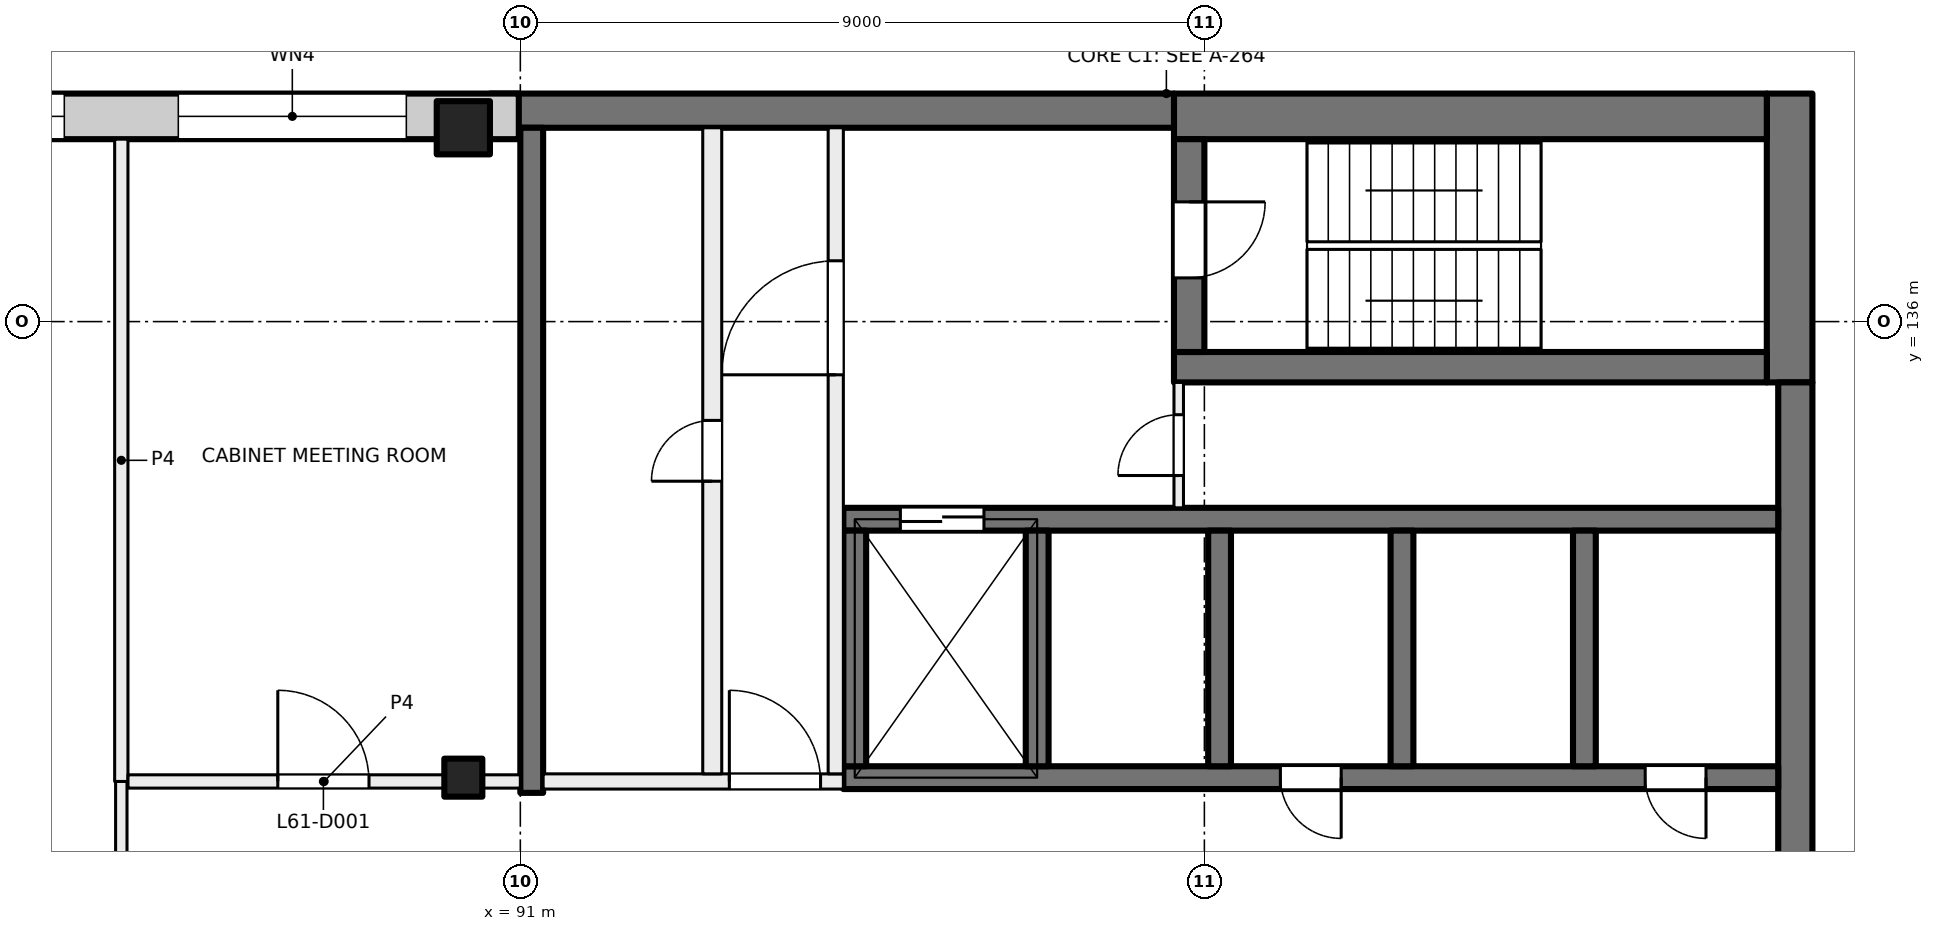
"""IFC4 building model, lengths in metres.
Left out: names, types, materials, properties, quantities, classifications, styles, units other than length and angle.
Written with IfcOpenShell. Run it as: python <this file> out.ifc"""

import sys

from ifc_helpers import new_model, si_unit, direction, frame, frame_2d, origin, origin_2d, place, context, subcontext, project, spatial, rectangle, extrude, element, fill, save


model = new_model("IFC4")
c1 = context("Model", 3, precision=1e-05, world=origin(), true_north=direction((0.0, 1.0)))
c2 = subcontext(c1, "Body", "Model", "MODEL_VIEW")
j1 = project(units=[si_unit("LENGTHUNIT", "METRE"), si_unit("PLANEANGLEUNIT", "RADIAN")], contexts=[c1])
p1 = place(None, origin())
s1 = spatial("IfcSite", under=j1, at=p1, CompositionType="ELEMENT")
p2 = place(p1, origin())
s2 = spatial("IfcBuilding", under=s1, at=p2, CompositionType="ELEMENT")
p3 = place(p2, frame((0.0, 0.0, 257.5)))
s3 = spatial("IfcBuildingStorey", under=s2, at=p3, CompositionType="ELEMENT", Elevation=257.5)
p4 = place(p3, frame((90.25, 130.0, 0.0), z_axis=(0.0, 0.0, 1.0), x_axis=(1.0, 0.0, 0.0)))
e1 = element("IfcColumn", 1, at=p4, inside=s3, PredefinedType="COLUMN", context=c2, shape_type="SweptSolid", body=[
    extrude(rectangle(XDim=0.5, YDim=0.5, at=origin_2d()), origin(), (0.0, 0.0, 1.0), 4.0),
])
p5 = place(p3, frame((90.25, 138.55, 0.0), z_axis=(0.0, 0.0, 1.0), x_axis=(1.0, 0.0, 0.0)))
e2 = element("IfcColumn", 2, at=p5, inside=s3, PredefinedType="COLUMN", context=c2, shape_type="SweptSolid", body=[
    extrude(rectangle(XDim=0.7, YDim=0.7, at=origin_2d()), origin(), (0.0, 0.0, 1.0), 4.0),
])
p6 = place(p3, frame((107.7, 139.0, 0.0), z_axis=(0.0, 0.0, 1.0), x_axis=(0.0, -1.0, 0.0)))
e3 = element("IfcWall", 3, at=p6, inside=s3, PredefinedType="SHEAR", context=c2, shape_type="SweptSolid", body=[
    extrude(rectangle(XDim=3.8, YDim=0.6, at=frame_2d((1.9, 0.0))), origin(), (0.0, 0.0, 1.0), 4.0),
])
p7 = place(p3, frame((107.775, 135.2, 0.0), z_axis=(0.0, 0.0, 1.0), x_axis=(0.0, -1.0, 0.0)))
e4 = element("IfcWall", 4, at=p7, inside=s3, PredefinedType="SHEAR", context=c2, shape_type="SweptSolid", body=[
    extrude(rectangle(XDim=14.4, YDim=0.45, at=frame_2d((7.2, 0.0))), origin(), (0.0, 0.0, 1.0), 4.0),
])
p8 = place(p3, frame((107.4, 138.7, 0.0), z_axis=(0.0, 0.0, 1.0), x_axis=(-1.0, 0.0, 0.0)))
e5 = element("IfcWall", 5, at=p8, inside=s3, PredefinedType="SHEAR", context=c2, shape_type="SweptSolid", body=[
    extrude(rectangle(XDim=7.8, YDim=0.6, at=frame_2d((3.9, 0.0))), origin(), (0.0, 0.0, 1.0), 4.0),
])
p9 = place(p3, frame((99.6, 138.775, 0.0), z_axis=(0.0, 0.0, 1.0), x_axis=(-1.0, 0.0, 0.0)))
e6 = element("IfcWall", 6, at=p9, inside=s3, PredefinedType="SHEAR", context=c2, shape_type="SweptSolid", body=[
    extrude(rectangle(XDim=9.0, YDim=0.45, at=frame_2d((4.5, 0.0))), origin(), (0.0, 0.0, 1.0), 4.0),
])
p10 = place(p3, frame((107.4, 135.4, 0.0), z_axis=(0.0, 0.0, 1.0), x_axis=(-1.0, 0.0, 0.0)))
e7 = element("IfcWall", 7, at=p10, inside=s3, PredefinedType="SHEAR", context=c2, shape_type="SweptSolid", body=[
    extrude(rectangle(XDim=7.8, YDim=0.4, at=frame_2d((3.9, 0.0))), origin(), (0.0, 0.0, 1.0), 4.0),
])
p11 = place(p3, frame((99.8, 138.4, 0.0), z_axis=(0.0, 0.0, 1.0), x_axis=(0.0, -1.0, 0.0)))
e8 = element("IfcWall", 8, at=p11, inside=s3, PredefinedType="SHEAR", context=c2, shape_type="SweptSolid", body=[
    extrude(rectangle(XDim=2.8, YDim=0.4, at=frame_2d((1.4, 0.0))), origin(), (0.0, 0.0, 1.0), 4.0),
])
p12 = place(p11, frame((0.825, 0.0, 0.0)))
e9 = element("IfcOpeningElement", 9, at=p12, cuts=e8, PredefinedType="OPENING", context=c2, shape_type="SweptSolid", body=[
    extrude(rectangle(XDim=1.0, YDim=2.1, at=frame_2d((0.5, 1.05))), frame((0.0, 0.21, 0.0), z_axis=(0.0, -1.0, 0.0), x_axis=(1.0, 0.0, 0.0)), (0.0, 0.0, 1.0), 0.42),
])
p13 = place(p3, frame((107.55, 130.0, 0.0), z_axis=(0.0, 0.0, 1.0), x_axis=(-1.0, 0.0, 0.0)))
e10 = element("IfcWall", 10, at=p13, inside=s3, PredefinedType="SHEAR", context=c2, shape_type="SweptSolid", body=[
    extrude(rectangle(XDim=12.3, YDim=0.3, at=frame_2d((6.15, 0.0))), origin(), (0.0, 0.0, 1.0), 4.0),
])
p14 = place(p13, frame((0.95, 0.0, 0.0)))
e11 = element("IfcOpeningElement", 11, at=p14, cuts=e10, PredefinedType="OPENING", context=c2, shape_type="SweptSolid", body=[
    extrude(rectangle(XDim=0.8, YDim=2.1, at=frame_2d((0.4, 1.05))), frame((0.0, 0.16, 0.0), z_axis=(0.0, -1.0, 0.0), x_axis=(1.0, 0.0, 0.0)), (0.0, 0.0, 1.0), 0.32),
])
p15 = place(p13, frame((5.75, 0.0, 0.0)))
e12 = element("IfcOpeningElement", 12, at=p15, cuts=e10, PredefinedType="OPENING", context=c2, shape_type="SweptSolid", body=[
    extrude(rectangle(XDim=0.8, YDim=2.1, at=frame_2d((0.4, 1.05))), frame((0.0, 0.16, 0.0), z_axis=(0.0, -1.0, 0.0), x_axis=(1.0, 0.0, 0.0)), (0.0, 0.0, 1.0), 0.32),
])
p16 = place(p3, frame((107.55, 133.4, 0.0), z_axis=(0.0, 0.0, 1.0), x_axis=(-1.0, 0.0, 0.0)))
e13 = element("IfcWall", 13, at=p16, inside=s3, PredefinedType="SHEAR", context=c2, shape_type="SweptSolid", body=[
    extrude(rectangle(XDim=12.3, YDim=0.3, at=frame_2d((6.15, 0.0))), origin(), (0.0, 0.0, 1.0), 4.0),
])
p17 = place(p16, frame((10.45, 0.0, 0.0)))
e14 = element("IfcOpeningElement", 14, at=p17, cuts=e13, PredefinedType="OPENING", context=c2, shape_type="SweptSolid", body=[
    extrude(rectangle(XDim=1.1, YDim=2.1, at=frame_2d((0.55, 1.05))), frame((0.0, 0.16, 0.0), z_axis=(0.0, -1.0, 0.0), x_axis=(1.0, 0.0, 0.0)), (0.0, 0.0, 1.0), 0.32),
])
for number, where, z_axis, x_axis in (
    (15, (105.0, 133.25, 0.0), (0.0, 0.0, 1.0), (0.0, -1.0, 0.0)),
    (16, (102.6, 133.25, 0.0), (0.0, 0.0, 1.0), (0.0, -1.0, 0.0)),
    (17, (100.2, 133.25, 0.0), (0.0, 0.0, 1.0), (0.0, -1.0, 0.0)),
    (18, (97.8, 133.25, 0.0), (0.0, 0.0, 1.0), (0.0, -1.0, 0.0)),
    (19, (95.4, 133.25, 0.0), (0.0, 0.0, 1.0), (0.0, -1.0, 0.0)),
):
    element("IfcWall", number, at=place(p3, frame(where, z_axis=z_axis, x_axis=x_axis)), inside=s3, PredefinedType="SHEAR", context=c2, shape_type="SweptSolid", body=[
        extrude(rectangle(XDim=3.1, YDim=0.3, at=frame_2d((1.55, 0.0))), origin(), (0.0, 0.0, 1.0), 4.0),
    ])
p18 = place(p3, frame((91.15, 138.55, 0.0), z_axis=(0.0, 0.0, 1.0), x_axis=(0.0, -1.0, 0.0)))
e20 = element("IfcWall", 20, at=p18, inside=s3, PredefinedType="SHEAR", context=c2, shape_type="SweptSolid", body=[
    extrude(rectangle(XDim=8.75, YDim=0.3, at=frame_2d((4.375, 0.0))), origin(), (0.0, 0.0, 1.0), 4.0),
])
p19 = place(p3, frame((47.07, 138.7, 0.0), z_axis=(0.0, 0.0, 1.0), x_axis=(1.0, 0.0, 0.0)))
e21 = element("IfcWall", 21, at=p19, inside=s3, PredefinedType="SOLIDWALL", context=c2, shape_type="SweptSolid", body=[
    extrude(rectangle(XDim=43.91, YDim=0.6, at=frame_2d((21.955, 0.0))), origin(), (0.0, 0.0, 1.0), 3.625),
])
p20 = place(p19, frame((3.43, 0.0, 0.9)))
e22 = element("IfcOpeningElement", 22, at=p20, cuts=e21, PredefinedType="OPENING", context=c2, shape_type="SweptSolid", body=[
    extrude(rectangle(XDim=3.0, YDim=2.4, at=frame_2d((1.5, 1.2))), frame((0.0, 0.31, 0.0), z_axis=(0.0, -1.0, 0.0), x_axis=(1.0, 0.0, 0.0)), (0.0, 0.0, 1.0), 0.62),
])
p21 = place(p19, frame((7.93, 0.0, 0.9)))
e23 = element("IfcOpeningElement", 23, at=p21, cuts=e21, PredefinedType="OPENING", context=c2, shape_type="SweptSolid", body=[
    extrude(rectangle(XDim=3.0, YDim=2.4, at=frame_2d((1.5, 1.2))), frame((0.0, 0.31, 0.0), z_axis=(0.0, -1.0, 0.0), x_axis=(1.0, 0.0, 0.0)), (0.0, 0.0, 1.0), 0.62),
])
p22 = place(p19, frame((12.43, 0.0, 0.9)))
e24 = element("IfcOpeningElement", 24, at=p22, cuts=e21, PredefinedType="OPENING", context=c2, shape_type="SweptSolid", body=[
    extrude(rectangle(XDim=3.0, YDim=2.4, at=frame_2d((1.5, 1.2))), frame((0.0, 0.31, 0.0), z_axis=(0.0, -1.0, 0.0), x_axis=(1.0, 0.0, 0.0)), (0.0, 0.0, 1.0), 0.62),
])
p23 = place(p19, frame((16.93, 0.0, 0.9)))
e25 = element("IfcOpeningElement", 25, at=p23, cuts=e21, PredefinedType="OPENING", context=c2, shape_type="SweptSolid", body=[
    extrude(rectangle(XDim=3.0, YDim=2.4, at=frame_2d((1.5, 1.2))), frame((0.0, 0.31, 0.0), z_axis=(0.0, -1.0, 0.0), x_axis=(1.0, 0.0, 0.0)), (0.0, 0.0, 1.0), 0.62),
])
p24 = place(p19, frame((21.43, 0.0, 0.9)))
e26 = element("IfcOpeningElement", 26, at=p24, cuts=e21, PredefinedType="OPENING", context=c2, shape_type="SweptSolid", body=[
    extrude(rectangle(XDim=3.0, YDim=2.4, at=frame_2d((1.5, 1.2))), frame((0.0, 0.31, 0.0), z_axis=(0.0, -1.0, 0.0), x_axis=(1.0, 0.0, 0.0)), (0.0, 0.0, 1.0), 0.62),
])
p25 = place(p19, frame((25.93, 0.0, 0.9)))
e27 = element("IfcOpeningElement", 27, at=p25, cuts=e21, PredefinedType="OPENING", context=c2, shape_type="SweptSolid", body=[
    extrude(rectangle(XDim=3.0, YDim=2.4, at=frame_2d((1.5, 1.2))), frame((0.0, 0.31, 0.0), z_axis=(0.0, -1.0, 0.0), x_axis=(1.0, 0.0, 0.0)), (0.0, 0.0, 1.0), 0.62),
])
p26 = place(p19, frame((30.43, 0.0, 0.9)))
e28 = element("IfcOpeningElement", 28, at=p26, cuts=e21, PredefinedType="OPENING", context=c2, shape_type="SweptSolid", body=[
    extrude(rectangle(XDim=3.0, YDim=2.4, at=frame_2d((1.5, 1.2))), frame((0.0, 0.31, 0.0), z_axis=(0.0, -1.0, 0.0), x_axis=(1.0, 0.0, 0.0)), (0.0, 0.0, 1.0), 0.62),
])
p27 = place(p19, frame((34.93, 0.0, 0.9)))
e29 = element("IfcOpeningElement", 29, at=p27, cuts=e21, PredefinedType="OPENING", context=c2, shape_type="SweptSolid", body=[
    extrude(rectangle(XDim=3.0, YDim=2.4, at=frame_2d((1.5, 1.2))), frame((0.0, 0.31, 0.0), z_axis=(0.0, -1.0, 0.0), x_axis=(1.0, 0.0, 0.0)), (0.0, 0.0, 1.0), 0.62),
])
p28 = place(p19, frame((39.43, 0.0, 0.9)))
e30 = element("IfcOpeningElement", 30, at=p28, cuts=e21, PredefinedType="OPENING", context=c2, shape_type="SweptSolid", body=[
    extrude(rectangle(XDim=3.0, YDim=2.4, at=frame_2d((1.5, 1.2))), frame((0.0, 0.31, 0.0), z_axis=(0.0, -1.0, 0.0), x_axis=(1.0, 0.0, 0.0)), (0.0, 0.0, 1.0), 0.62),
])
p29 = place(p3, frame((91.3, 129.95, 0.0), z_axis=(0.0, 0.0, 1.0), x_axis=(1.0, 0.0, 0.0)))
e31 = element("IfcWall", 31, at=p29, inside=s3, PredefinedType="PARTITIONING", context=c2, shape_type="SweptSolid", body=[
    extrude(rectangle(XDim=3.95, YDim=0.2, at=frame_2d((1.975, 0.0))), origin(), (0.0, 0.0, 1.0), 3.625),
])
p30 = place(p29, frame((2.45, 0.0, 0.0)))
e32 = element("IfcOpeningElement", 32, at=p30, cuts=e31, PredefinedType="OPENING", context=c2, shape_type="SweptSolid", body=[
    extrude(rectangle(XDim=1.2, YDim=2.1, at=frame_2d((0.6, 1.05))), frame((0.0, 0.11, 0.0), z_axis=(0.0, -1.0, 0.0), x_axis=(1.0, 0.0, 0.0)), (0.0, 0.0, 1.0), 0.22),
])
p31 = place(p3, frame((95.15, 130.05, 0.0), z_axis=(0.0, 0.0, 1.0), x_axis=(0.0, 1.0, 0.0)))
e33 = element("IfcWall", 33, at=p31, inside=s3, PredefinedType="PARTITIONING", context=c2, shape_type="SweptSolid", body=[
    extrude(rectangle(XDim=8.5, YDim=0.2, at=frame_2d((4.25, 0.0))), origin(), (0.0, 0.0, 1.0), 3.625),
])
p32 = place(p31, frame((5.25, 0.0, 0.0)))
e34 = element("IfcOpeningElement", 34, at=p32, cuts=e33, PredefinedType="OPENING", context=c2, shape_type="SweptSolid", body=[
    extrude(rectangle(XDim=1.5, YDim=2.1, at=frame_2d((0.75, 1.05))), frame((0.0, 0.11, 0.0), z_axis=(0.0, -1.0, 0.0), x_axis=(1.0, 0.0, 0.0)), (0.0, 0.0, 1.0), 0.22),
])
p33 = place(p3, frame((93.525, 130.05, 0.0), z_axis=(0.0, 0.0, 1.0), x_axis=(0.0, 1.0, 0.0)))
e35 = element("IfcWall", 35, at=p33, inside=s3, PredefinedType="PARTITIONING", context=c2, shape_type="SweptSolid", body=[
    extrude(rectangle(XDim=8.5, YDim=0.25, at=frame_2d((4.25, 0.0))), origin(), (0.0, 0.0, 1.0), 3.625),
])
p34 = place(p33, frame((3.85, 0.0, 0.0)))
e36 = element("IfcOpeningElement", 36, at=p34, cuts=e35, PredefinedType="OPENING", context=c2, shape_type="SweptSolid", body=[
    extrude(rectangle(XDim=0.8, YDim=2.1, at=frame_2d((0.4, 1.05))), frame((0.0, 0.135, 0.0), z_axis=(0.0, -1.0, 0.0), x_axis=(1.0, 0.0, 0.0)), (0.0, 0.0, 1.0), 0.27),
])
p35 = place(p3, frame((99.663, 133.55, 0.0), z_axis=(0.0, 0.0, 1.0), x_axis=(0.0, 1.0, 0.0)))
e37 = element("IfcWall", 37, at=p35, inside=s3, PredefinedType="PARTITIONING", context=c2, shape_type="SweptSolid", body=[
    extrude(rectangle(XDim=1.65, YDim=0.125, at=frame_2d((0.825, 0.0))), origin(), (0.0, 0.0, 1.0), 3.625),
])
p36 = place(p35, frame((0.425, 0.0, 0.0)))
e38 = element("IfcOpeningElement", 38, at=p36, cuts=e37, PredefinedType="OPENING", context=c2, shape_type="SweptSolid", body=[
    extrude(rectangle(XDim=0.8, YDim=2.1, at=frame_2d((0.4, 1.05))), frame((0.0, 0.073, 0.0), z_axis=(0.0, -1.0, 0.0), x_axis=(1.0, 0.0, 0.0)), (0.0, 0.0, 1.0), 0.145),
])
p37 = place(p3, frame((85.75, 121.5, 0.0), z_axis=(0.0, 0.0, 1.0), x_axis=(0.0, 1.0, 0.0)))
e39 = element("IfcWall", 39, at=p37, inside=s3, PredefinedType="PARTITIONING", context=c2, shape_type="SweptSolid", body=[
    extrude(rectangle(XDim=8.45, YDim=0.15, at=frame_2d((4.225, 0.0))), origin(), (0.0, 0.0, 1.0), 3.625),
])
p38 = place(p3, frame((85.75, 129.95, 0.0), z_axis=(0.0, 0.0, 1.0), x_axis=(0.0, 1.0, 0.0)))
e40 = element("IfcWall", 40, at=p38, inside=s3, PredefinedType="PARTITIONING", context=c2, shape_type="SweptSolid", body=[
    extrude(rectangle(XDim=8.45, YDim=0.175, at=frame_2d((4.225, 0.0))), origin(), (0.0, 0.0, 1.0), 3.625),
])
p39 = place(p3, frame((85.838, 129.95, 0.0), z_axis=(0.0, 0.0, 1.0), x_axis=(1.0, 0.0, 0.0)))
e41 = element("IfcWall", 41, at=p39, inside=s3, PredefinedType="PARTITIONING", context=c2, shape_type="SweptSolid", body=[
    extrude(rectangle(XDim=5.162, YDim=0.175, at=frame_2d((2.581, 0.0))), origin(), (0.0, 0.0, 1.0), 3.625),
])
p40 = place(p39, frame((1.971, 0.0, 0.0)))
e42 = element("IfcOpeningElement", 42, at=p40, cuts=e41, PredefinedType="OPENING", context=c2, shape_type="SweptSolid", body=[
    extrude(rectangle(XDim=1.2, YDim=2.1, at=frame_2d((0.6, 1.05))), frame((0.0, 0.097, 0.0), z_axis=(0.0, -1.0, 0.0), x_axis=(1.0, 0.0, 0.0)), (0.0, 0.0, 1.0), 0.195),
])
p41 = place(p27, origin())
e43 = element("IfcWindow", 43, at=p41, inside=s3, PartitioningType="SINGLE_PANEL", PredefinedType="WINDOW", context=c2, shape_type="SweptSolid", body=[
    extrude(rectangle(XDim=3.0, YDim=2.4, at=frame_2d((1.5, 1.2))), frame((0.0, 0.03, 0.0), z_axis=(0.0, -1.0, 0.0), x_axis=(1.0, 0.0, 0.0)), (0.0, 0.0, 1.0), 0.06),
])
fill(e29, e43)
p42 = place(p28, origin())
e44 = element("IfcWindow", 44, at=p42, inside=s3, PartitioningType="SINGLE_PANEL", PredefinedType="WINDOW", context=c2, shape_type="SweptSolid", body=[
    extrude(rectangle(XDim=3.0, YDim=2.4, at=frame_2d((1.5, 1.2))), frame((0.0, 0.03, 0.0), z_axis=(0.0, -1.0, 0.0), x_axis=(1.0, 0.0, 0.0)), (0.0, 0.0, 1.0), 0.06),
])
fill(e30, e44)
p43 = place(p14, origin())
e45 = element("IfcDoor", 45, at=p43, inside=s3, OperationType="SINGLE_SWING_LEFT", PredefinedType="DOOR", context=c2, shape_type="SweptSolid", body=[
    extrude(rectangle(XDim=0.8, YDim=2.1, at=frame_2d((0.4, 1.05))), frame((0.0, 0.025, 0.0), z_axis=(0.0, -1.0, 0.0), x_axis=(1.0, 0.0, 0.0)), (0.0, 0.0, 1.0), 0.05),
])
fill(e11, e45)
p44 = place(p15, origin())
e46 = element("IfcDoor", 46, at=p44, inside=s3, OperationType="SINGLE_SWING_RIGHT", PredefinedType="DOOR", context=c2, shape_type="SweptSolid", body=[
    extrude(rectangle(XDim=0.8, YDim=2.1, at=frame_2d((0.4, 1.05))), frame((0.0, 0.025, 0.0), z_axis=(0.0, -1.0, 0.0), x_axis=(1.0, 0.0, 0.0)), (0.0, 0.0, 1.0), 0.05),
])
fill(e12, e46)
p45 = place(p30, origin())
e47 = element("IfcDoor", 47, at=p45, inside=s3, OperationType="DOUBLE_DOOR_SINGLE_SWING", PredefinedType="DOOR", context=c2, shape_type="SweptSolid", body=[
    extrude(rectangle(XDim=1.2, YDim=2.1, at=frame_2d((0.6, 1.05))), frame((0.0, 0.025, 0.0), z_axis=(0.0, -1.0, 0.0), x_axis=(1.0, 0.0, 0.0)), (0.0, 0.0, 1.0), 0.05),
])
fill(e32, e47)
p46 = place(p32, origin())
e48 = element("IfcDoor", 48, at=p46, inside=s3, OperationType="DOUBLE_DOOR_SINGLE_SWING", PredefinedType="DOOR", context=c2, shape_type="SweptSolid", body=[
    extrude(rectangle(XDim=1.5, YDim=2.1, at=frame_2d((0.75, 1.05))), frame((0.0, 0.025, 0.0), z_axis=(0.0, -1.0, 0.0), x_axis=(1.0, 0.0, 0.0)), (0.0, 0.0, 1.0), 0.05),
])
fill(e34, e48)
p47 = place(p12, origin())
e49 = element("IfcDoor", 49, at=p47, inside=s3, OperationType="SINGLE_SWING_RIGHT", PredefinedType="DOOR", context=c2, shape_type="SweptSolid", body=[
    extrude(rectangle(XDim=1.0, YDim=2.1, at=frame_2d((0.5, 1.05))), frame((0.0, 0.025, 0.0), z_axis=(0.0, -1.0, 0.0), x_axis=(1.0, 0.0, 0.0)), (0.0, 0.0, 1.0), 0.05),
])
fill(e9, e49)
p48 = place(p36, origin())
e50 = element("IfcDoor", 50, at=p48, inside=s3, OperationType="SINGLE_SWING_LEFT", PredefinedType="DOOR", context=c2, shape_type="SweptSolid", body=[
    extrude(rectangle(XDim=0.8, YDim=2.1, at=frame_2d((0.4, 1.05))), frame((0.0, 0.025, 0.0), z_axis=(0.0, -1.0, 0.0), x_axis=(1.0, 0.0, 0.0)), (0.0, 0.0, 1.0), 0.05),
])
fill(e38, e50)
p49 = place(p34, origin())
e51 = element("IfcDoor", 51, at=p49, inside=s3, OperationType="SINGLE_SWING_RIGHT", PredefinedType="DOOR", context=c2, shape_type="SweptSolid", body=[
    extrude(rectangle(XDim=0.8, YDim=2.1, at=frame_2d((0.4, 1.05))), frame((0.0, 0.025, 0.0), z_axis=(0.0, -1.0, 0.0), x_axis=(1.0, 0.0, 0.0)), (0.0, 0.0, 1.0), 0.05),
])
fill(e36, e51)
p50 = place(p17, origin())
e52 = element("IfcDoor", 52, at=p50, inside=s3, OperationType="DOUBLE_DOOR_SLIDING", PredefinedType="DOOR", context=c2, shape_type="SweptSolid", body=[
    extrude(rectangle(XDim=1.1, YDim=2.1, at=frame_2d((0.55, 1.05))), frame((0.0, 0.025, 0.0), z_axis=(0.0, -1.0, 0.0), x_axis=(1.0, 0.0, 0.0)), (0.0, 0.0, 1.0), 0.05),
])
fill(e14, e52)
p51 = place(p40, origin())
e53 = element("IfcDoor", 53, at=p51, inside=s3, OperationType="DOUBLE_DOOR_SINGLE_SWING", PredefinedType="DOOR", context=c2, shape_type="SweptSolid", body=[
    extrude(rectangle(XDim=1.2, YDim=2.1, at=frame_2d((0.6, 1.05))), frame((0.0, 0.025, 0.0), z_axis=(0.0, -1.0, 0.0), x_axis=(1.0, 0.0, 0.0)), (0.0, 0.0, 1.0), 0.05),
])
fill(e42, e53)
save(model, sys.argv[1])
